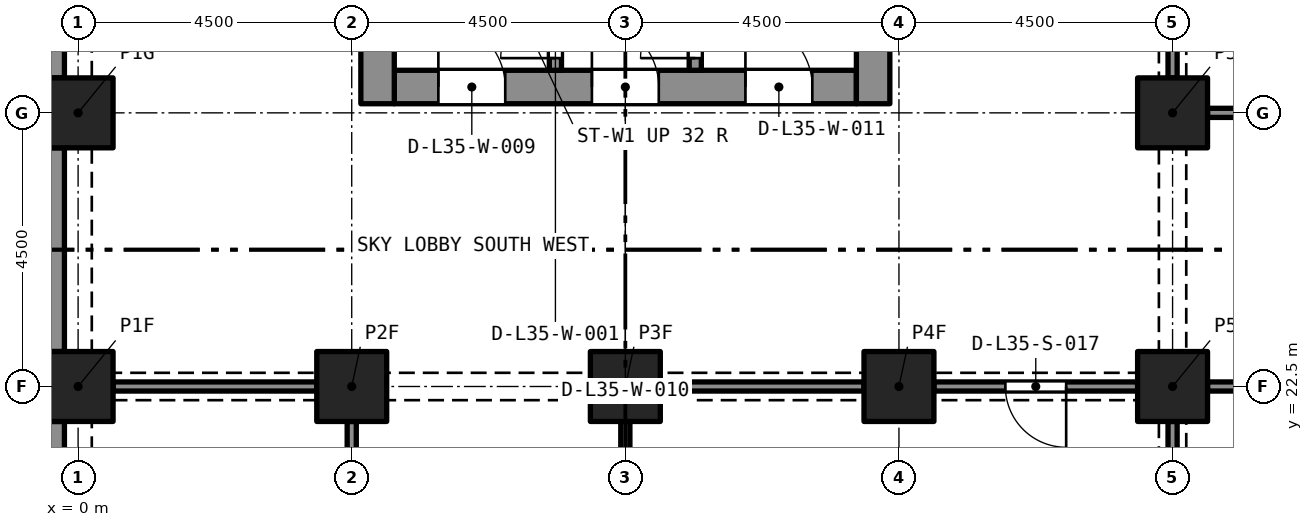
"""IFC4 building model, lengths in metres.
Left out: names, types, materials, properties, quantities, classifications, styles, units other than length and angle.
Written with IfcOpenShell. Run it as: python <this file> out.ifc"""

import sys

from ifc_helpers import new_model, si_unit, direction, frame, frame_2d, origin, origin_2d, place, context, subcontext, project, spatial, rectangle, extrude, element, fill, save


model = new_model("IFC4")
c1 = context("Model", 3, precision=1e-05, world=origin(), true_north=direction((0.0, 1.0)))
c2 = subcontext(c1, "Body", "Model", "MODEL_VIEW")
j1 = project(units=[si_unit("LENGTHUNIT", "METRE"), si_unit("PLANEANGLEUNIT", "RADIAN")], contexts=[c1])
p1 = place(None, origin())
s1 = spatial("IfcSite", under=j1, at=p1, CompositionType="ELEMENT")
p2 = place(p1, origin())
s2 = spatial("IfcBuilding", under=s1, at=p2, CompositionType="ELEMENT")
p3 = place(p2, frame((0.0, 0.0, 124.8)))
s3 = spatial("IfcBuildingStorey", under=s2, at=p3, CompositionType="ELEMENT", Elevation=124.8)
for number, where, z_axis, x_axis in (
    (1, (0.0, 22.5, 0.0), (0.0, 0.0, 1.0), (1.0, 0.0, 0.0)),
    (2, (4.5, 22.5, 0.0), (0.0, 0.0, 1.0), (1.0, 0.0, 0.0)),
    (3, (9.0, 22.5, 0.0), (0.0, 0.0, 1.0), (1.0, 0.0, 0.0)),
    (4, (13.5, 22.5, 0.0), (0.0, 0.0, 1.0), (1.0, 0.0, 0.0)),
    (5, (18.0, 22.5, 0.0), (0.0, 0.0, 1.0), (1.0, 0.0, 0.0)),
    (6, (0.0, 27.0, 0.0), (0.0, 0.0, 1.0), (1.0, 0.0, 0.0)),
    (7, (18.0, 27.0, 0.0), (0.0, 0.0, 1.0), (1.0, 0.0, 0.0)),
):
    element("IfcColumn", number, at=place(p3, frame(where, z_axis=z_axis, x_axis=x_axis)), inside=s3, PredefinedType="COLUMN", context=c2, shape_type="SweptSolid", body=[
        extrude(rectangle(XDim=1.15, YDim=1.15, at=origin_2d()), origin(), (0.0, 0.0, 1.0), 5.4),
    ])
p4 = place(p3, frame((5.2, 27.425, 0.0), z_axis=(0.0, 0.0, 1.0), x_axis=(1.0, 0.0, 0.0)))
e8 = element("IfcWall", 8, at=p4, inside=s3, PredefinedType="SOLIDWALL", context=c2, shape_type="SweptSolid", body=[
    extrude(rectangle(XDim=7.6, YDim=0.55, at=frame_2d((3.8, 0.0))), origin(), (0.0, 0.0, 1.0), 5.4),
])
p5 = place(p4, frame((0.725, 0.0, 0.0)))
e9 = element("IfcOpeningElement", 9, at=p5, cuts=e8, PredefinedType="OPENING", context=c2, shape_type="SweptSolid", body=[
    extrude(rectangle(XDim=1.1, YDim=2.1, at=frame_2d((0.55, 1.05))), frame((0.0, 0.285, 0.0), z_axis=(0.0, -1.0, 0.0), x_axis=(1.0, 0.0, 0.0)), (0.0, 0.0, 1.0), 0.57),
])
p6 = place(p4, frame((3.25, 0.0, 0.0)))
e10 = element("IfcOpeningElement", 10, at=p6, cuts=e8, PredefinedType="OPENING", context=c2, shape_type="SweptSolid", body=[
    extrude(rectangle(XDim=1.1, YDim=2.1, at=frame_2d((0.55, 1.05))), frame((0.0, 0.285, 0.0), z_axis=(0.0, -1.0, 0.0), x_axis=(1.0, 0.0, 0.0)), (0.0, 0.0, 1.0), 0.57),
])
p7 = place(p4, frame((5.775, 0.0, 0.0)))
e11 = element("IfcOpeningElement", 11, at=p7, cuts=e8, PredefinedType="OPENING", context=c2, shape_type="SweptSolid", body=[
    extrude(rectangle(XDim=1.1, YDim=2.1, at=frame_2d((0.55, 1.05))), frame((0.0, 0.285, 0.0), z_axis=(0.0, -1.0, 0.0), x_axis=(1.0, 0.0, 0.0)), (0.0, 0.0, 1.0), 0.57),
])
p8 = place(p3, frame((4.925, 27.15, 0.0), z_axis=(0.0, 0.0, 1.0), x_axis=(0.0, 1.0, 0.0)))
e12 = element("IfcWall", 12, at=p8, inside=s3, PredefinedType="SOLIDWALL", context=c2, shape_type="SweptSolid", body=[
    extrude(rectangle(XDim=13.2, YDim=0.55, at=frame_2d((6.6, 0.0))), origin(), (0.0, 0.0, 1.0), 5.4),
])
p9 = place(p8, frame((8.8, 0.0, 0.0)))
e13 = element("IfcOpeningElement", 13, at=p9, cuts=e12, PredefinedType="OPENING", context=c2, shape_type="SweptSolid", body=[
    extrude(rectangle(XDim=1.2, YDim=2.1, at=frame_2d((0.6, 1.05))), frame((0.0, 0.285, 0.0), z_axis=(0.0, -1.0, 0.0), x_axis=(1.0, 0.0, 0.0)), (0.0, 0.0, 1.0), 0.57),
])
p10 = place(p3, frame((13.075, 27.15, 0.0), z_axis=(0.0, 0.0, 1.0), x_axis=(0.0, 1.0, 0.0)))
e14 = element("IfcWall", 14, at=p10, inside=s3, PredefinedType="SOLIDWALL", context=c2, shape_type="SweptSolid", body=[
    extrude(rectangle(XDim=13.2, YDim=0.55, at=frame_2d((6.6, 0.0))), origin(), (0.0, 0.0, 1.0), 5.4),
])
p11 = place(p10, frame((10.95, 0.0, 0.0)))
e15 = element("IfcOpeningElement", 15, at=p11, cuts=e14, PredefinedType="OPENING", context=c2, shape_type="SweptSolid", body=[
    extrude(rectangle(XDim=1.1, YDim=2.1, at=frame_2d((0.55, 1.05))), frame((0.0, 0.285, 0.0), z_axis=(0.0, -1.0, 0.0), x_axis=(1.0, 0.0, 0.0)), (0.0, 0.0, 1.0), 0.57),
])
p12 = place(p10, frame((8.8, 0.0, 0.0)))
e16 = element("IfcOpeningElement", 16, at=p12, cuts=e14, PredefinedType="OPENING", context=c2, shape_type="SweptSolid", body=[
    extrude(rectangle(XDim=1.2, YDim=2.1, at=frame_2d((0.6, 1.05))), frame((0.0, 0.285, 0.0), z_axis=(0.0, -1.0, 0.0), x_axis=(1.0, 0.0, 0.0)), (0.0, 0.0, 1.0), 0.57),
])
for number, where, z_axis, x_axis in (
    (17, (-0.375, 27.575, 0.0), (0.0, 0.0, 1.0), (0.0, 1.0, 0.0)),
    (18, (-0.375, 23.075, 0.0), (0.0, 0.0, 1.0), (0.0, 1.0, 0.0)),
    (19, (-0.375, 18.575, 0.0), (0.0, 0.0, 1.0), (0.0, 1.0, 0.0)),
):
    element("IfcWall", number, at=place(p3, frame(where, z_axis=z_axis, x_axis=x_axis)), inside=s3, PredefinedType="SOLIDWALL", context=c2, shape_type="SweptSolid", body=[
        extrude(rectangle(XDim=3.35, YDim=0.3, at=frame_2d((1.675, 0.0))), origin(), (0.0, 0.0, 1.0), 5.4),
    ])
p13 = place(p3, frame((7.85, 27.7, 0.0), z_axis=(0.0, 0.0, 1.0), x_axis=(0.0, 1.0, 0.0)))
e20 = element("IfcWall", 20, at=p13, inside=s3, PredefinedType="SOLIDWALL", context=c2, shape_type="SweptSolid", body=[
    extrude(rectangle(XDim=5.4, YDim=0.2, at=frame_2d((2.7, 0.0))), origin(), (0.0, 0.0, 1.0), 5.1),
])
p14 = place(p13, frame((0.2, 0.0, 0.0)))
e21 = element("IfcOpeningElement", 21, at=p14, cuts=e20, PredefinedType="OPENING", context=c2, shape_type="SweptSolid", body=[
    extrude(rectangle(XDim=0.9, YDim=2.1, at=frame_2d((0.45, 1.05))), frame((0.0, 0.11, 0.0), z_axis=(0.0, -1.0, 0.0), x_axis=(1.0, 0.0, 0.0)), (0.0, 0.0, 1.0), 0.22),
])
p15 = place(p3, frame((10.15, 27.7, 0.0), z_axis=(0.0, 0.0, 1.0), x_axis=(0.0, 1.0, 0.0)))
e22 = element("IfcWall", 22, at=p15, inside=s3, PredefinedType="SOLIDWALL", context=c2, shape_type="SweptSolid", body=[
    extrude(rectangle(XDim=5.4, YDim=0.2, at=frame_2d((2.7, 0.0))), origin(), (0.0, 0.0, 1.0), 5.1),
])
p16 = place(p15, frame((0.2, 0.0, 0.0)))
e23 = element("IfcOpeningElement", 23, at=p16, cuts=e22, PredefinedType="OPENING", context=c2, shape_type="SweptSolid", body=[
    extrude(rectangle(XDim=0.9, YDim=2.1, at=frame_2d((0.45, 1.05))), frame((0.0, 0.11, 0.0), z_axis=(0.0, -1.0, 0.0), x_axis=(1.0, 0.0, 0.0)), (0.0, 0.0, 1.0), 0.22),
])
p17 = place(p3, frame((18.575, 27.0, 0.0), z_axis=(0.0, 0.0, 1.0), x_axis=(1.0, 0.0, 0.0)))
e24 = element("IfcWall", 24, at=p17, inside=s3, PredefinedType="PARTITIONING", context=c2, shape_type="SweptSolid", body=[
    extrude(rectangle(XDim=12.35, YDim=0.15, at=frame_2d((6.175, 0.0))), origin(), (0.0, 0.0, 1.0), 4.95),
])
p18 = place(p17, frame((5.425, 0.0, 0.0)))
e25 = element("IfcOpeningElement", 25, at=p18, cuts=e24, PredefinedType="OPENING", context=c2, shape_type="SweptSolid", body=[
    extrude(rectangle(XDim=1.5, YDim=2.4, at=frame_2d((0.75, 1.2))), frame((0.0, 0.085, 0.0), z_axis=(0.0, -1.0, 0.0), x_axis=(1.0, 0.0, 0.0)), (0.0, 0.0, 1.0), 0.17),
])
p19 = place(p3, frame((30.925, 22.5, 0.0), z_axis=(0.0, 0.0, 1.0), x_axis=(-1.0, 0.0, 0.0)))
e26 = element("IfcWall", 26, at=p19, inside=s3, PredefinedType="PARTITIONING", context=c2, shape_type="SweptSolid", body=[
    extrude(rectangle(XDim=12.35, YDim=0.15, at=frame_2d((6.175, 0.0))), origin(), (0.0, 0.0, 1.0), 4.95),
])
p20 = place(p19, frame((5.425, 0.0, 0.0)))
e27 = element("IfcOpeningElement", 27, at=p20, cuts=e26, PredefinedType="OPENING", context=c2, shape_type="SweptSolid", body=[
    extrude(rectangle(XDim=1.5, YDim=2.4, at=frame_2d((0.75, 1.2))), frame((0.0, 0.085, 0.0), z_axis=(0.0, -1.0, 0.0), x_axis=(1.0, 0.0, 0.0)), (0.0, 0.0, 1.0), 0.17),
])
for number, where, z_axis, x_axis in (
    (28, (18.0, 27.575, 0.0), (0.0, 0.0, 1.0), (0.0, 1.0, 0.0)),
    (29, (18.0, 18.575, 0.0), (0.0, 0.0, 1.0), (0.0, 1.0, 0.0)),
):
    element("IfcWall", number, at=place(p3, frame(where, z_axis=z_axis, x_axis=x_axis)), inside=s3, PredefinedType="PARTITIONING", context=c2, shape_type="SweptSolid", body=[
        extrude(rectangle(XDim=3.35, YDim=0.15, at=frame_2d((1.675, 0.0))), origin(), (0.0, 0.0, 1.0), 4.58),
    ])
p21 = place(p3, frame((17.425, 22.5, 0.0), z_axis=(0.0, 0.0, 1.0), x_axis=(-1.0, 0.0, 0.0)))
e30 = element("IfcWall", 30, at=p21, inside=s3, PredefinedType="PARTITIONING", context=c2, shape_type="SweptSolid", body=[
    extrude(rectangle(XDim=3.35, YDim=0.15, at=frame_2d((1.675, 0.0))), origin(), (0.0, 0.0, 1.0), 4.58),
])
p22 = place(p21, frame((1.175, 0.0, 0.0)))
e31 = element("IfcOpeningElement", 31, at=p22, cuts=e30, PredefinedType="OPENING", context=c2, shape_type="SweptSolid", body=[
    extrude(rectangle(XDim=1.0, YDim=2.1, at=frame_2d((0.5, 1.05))), frame((0.0, 0.085, 0.0), z_axis=(0.0, -1.0, 0.0), x_axis=(1.0, 0.0, 0.0)), (0.0, 0.0, 1.0), 0.17),
])
for number, where, z_axis, x_axis in (
    (32, (9.575, 22.5, 0.0), (0.0, 0.0, 1.0), (1.0, 0.0, 0.0)),
    (33, (0.575, 22.5, 0.0), (0.0, 0.0, 1.0), (1.0, 0.0, 0.0)),
):
    element("IfcWall", number, at=place(p3, frame(where, z_axis=z_axis, x_axis=x_axis)), inside=s3, PredefinedType="PARTITIONING", context=c2, shape_type="SweptSolid", body=[
        extrude(rectangle(XDim=3.35, YDim=0.15, at=frame_2d((1.675, 0.0))), origin(), (0.0, 0.0, 1.0), 4.58),
    ])
p23 = place(p3, frame((9.0, 21.925, 0.0), z_axis=(0.0, 0.0, 1.0), x_axis=(0.0, -1.0, 0.0)))
e34 = element("IfcWall", 34, at=p23, inside=s3, PredefinedType="PARTITIONING", context=c2, shape_type="SweptSolid", body=[
    extrude(rectangle(XDim=8.425, YDim=0.15, at=frame_2d((4.212, 0.0))), origin(), (0.0, 0.0, 1.0), 5.1),
])
p24 = place(p23, frame((3.613, 0.0, 0.0)))
e35 = element("IfcOpeningElement", 35, at=p24, cuts=e34, PredefinedType="OPENING", context=c2, shape_type="SweptSolid", body=[
    extrude(rectangle(XDim=1.2, YDim=2.1, at=frame_2d((0.6, 1.05))), frame((0.0, 0.085, 0.0), z_axis=(0.0, -1.0, 0.0), x_axis=(1.0, 0.0, 0.0)), (0.0, 0.0, 1.0), 0.17),
])
p25 = place(p3, frame((4.5, 13.5, 0.0), z_axis=(0.0, 0.0, 1.0), x_axis=(0.0, 1.0, 0.0)))
e36 = element("IfcWall", 36, at=p25, inside=s3, PredefinedType="PARTITIONING", context=c2, shape_type="SweptSolid", body=[
    extrude(rectangle(XDim=8.425, YDim=0.15, at=frame_2d((4.212, 0.0))), origin(), (0.0, 0.0, 1.0), 5.1),
])
p26 = place(p25, frame((3.812, 0.0, 0.0)))
e37 = element("IfcOpeningElement", 37, at=p26, cuts=e36, PredefinedType="OPENING", context=c2, shape_type="SweptSolid", body=[
    extrude(rectangle(XDim=0.8, YDim=2.1, at=frame_2d((0.4, 1.05))), frame((0.0, 0.085, 0.0), z_axis=(0.0, -1.0, 0.0), x_axis=(1.0, 0.0, 0.0)), (0.0, 0.0, 1.0), 0.17),
])
p27 = place(p14, origin())
e38 = element("IfcDoor", 38, at=p27, inside=s3, OperationType="SINGLE_SWING_LEFT", PredefinedType="DOOR", context=c2, shape_type="SweptSolid", body=[
    extrude(rectangle(XDim=0.9, YDim=2.1, at=frame_2d((0.45, 1.05))), frame((0.0, 0.025, 0.0), z_axis=(0.0, -1.0, 0.0), x_axis=(1.0, 0.0, 0.0)), (0.0, 0.0, 1.0), 0.05),
])
fill(e21, e38)
p28 = place(p16, origin())
e39 = element("IfcDoor", 39, at=p28, inside=s3, OperationType="SINGLE_SWING_LEFT", PredefinedType="DOOR", context=c2, shape_type="SweptSolid", body=[
    extrude(rectangle(XDim=0.9, YDim=2.1, at=frame_2d((0.45, 1.05))), frame((0.0, 0.025, 0.0), z_axis=(0.0, -1.0, 0.0), x_axis=(1.0, 0.0, 0.0)), (0.0, 0.0, 1.0), 0.05),
])
fill(e23, e39)
p29 = place(p5, origin())
e40 = element("IfcDoor", 40, at=p29, inside=s3, OperationType="SINGLE_SWING_LEFT", PredefinedType="DOOR", context=c2, shape_type="SweptSolid", body=[
    extrude(rectangle(XDim=1.1, YDim=2.1, at=frame_2d((0.55, 1.05))), frame((0.0, 0.025, 0.0), z_axis=(0.0, -1.0, 0.0), x_axis=(1.0, 0.0, 0.0)), (0.0, 0.0, 1.0), 0.05),
])
fill(e9, e40)
p30 = place(p6, origin())
e41 = element("IfcDoor", 41, at=p30, inside=s3, OperationType="SINGLE_SWING_LEFT", PredefinedType="DOOR", context=c2, shape_type="SweptSolid", body=[
    extrude(rectangle(XDim=1.1, YDim=2.1, at=frame_2d((0.55, 1.05))), frame((0.0, 0.025, 0.0), z_axis=(0.0, -1.0, 0.0), x_axis=(1.0, 0.0, 0.0)), (0.0, 0.0, 1.0), 0.05),
])
fill(e10, e41)
p31 = place(p7, origin())
e42 = element("IfcDoor", 42, at=p31, inside=s3, OperationType="SINGLE_SWING_LEFT", PredefinedType="DOOR", context=c2, shape_type="SweptSolid", body=[
    extrude(rectangle(XDim=1.1, YDim=2.1, at=frame_2d((0.55, 1.05))), frame((0.0, 0.025, 0.0), z_axis=(0.0, -1.0, 0.0), x_axis=(1.0, 0.0, 0.0)), (0.0, 0.0, 1.0), 0.05),
])
fill(e11, e42)
p32 = place(p22, origin())
e43 = element("IfcDoor", 43, at=p32, inside=s3, OperationType="SINGLE_SWING_RIGHT", PredefinedType="DOOR", context=c2, shape_type="SweptSolid", body=[
    extrude(rectangle(XDim=1.0, YDim=2.1, at=frame_2d((0.5, 1.05))), frame((0.0, 0.025, 0.0), z_axis=(0.0, -1.0, 0.0), x_axis=(1.0, 0.0, 0.0)), (0.0, 0.0, 1.0), 0.05),
])
fill(e31, e43)
save(model, sys.argv[1])
